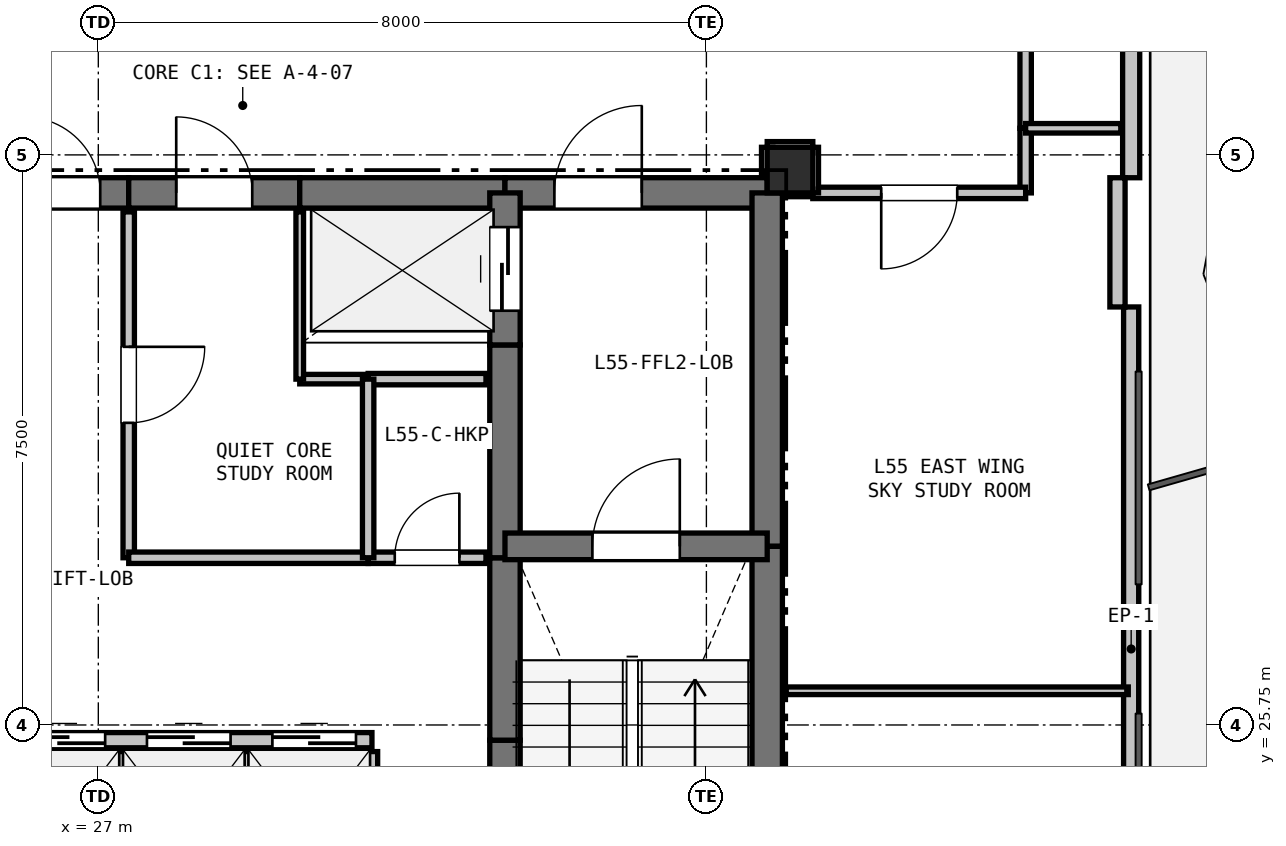
"""IFC4 building model, lengths in metres.
Left out: names, types, materials, properties, quantities, classifications, styles, units other than length and angle.
Written with IfcOpenShell. Run it as: python <this file> out.ifc"""

import sys

from ifc_helpers import new_model, si_unit, direction, frame, frame_2d, origin, origin_2d, place, context, subcontext, project, spatial, rectangle, extrude, element, fill, save


model = new_model("IFC4")
c1 = context("Model", 3, precision=1e-05, world=origin(), true_north=direction((0.0, 1.0)))
c2 = subcontext(c1, "Body", "Model", "MODEL_VIEW")
j1 = project(units=[si_unit("LENGTHUNIT", "METRE"), si_unit("PLANEANGLEUNIT", "RADIAN")], contexts=[c1])
p1 = place(None, origin())
s1 = spatial("IfcSite", under=j1, at=p1, CompositionType="ELEMENT")
p2 = place(p1, origin())
s2 = spatial("IfcBuilding", under=s1, at=p2, CompositionType="ELEMENT")
p3 = place(p2, frame((0.0, 0.0, 198.6)))
s3 = spatial("IfcBuildingStorey", under=s2, at=p3, CompositionType="ELEMENT", Elevation=198.6)
p4 = place(p3, frame((36.1, 33.05, 0.0), z_axis=(0.0, 0.0, 1.0), x_axis=(1.0, 0.0, 0.0)))
e1 = element("IfcColumn", 1, at=p4, inside=s3, PredefinedType="COLUMN", context=c2, shape_type="SweptSolid", body=[
    extrude(rectangle(XDim=0.6, YDim=0.6, at=origin_2d()), origin(), (0.0, 0.0, 1.0), 3.3),
])
p5 = place(p3, frame((19.309, 34.536, 0.0), z_axis=(0.0, 0.0, 1.0), x_axis=(0.866020680503, 0.500008180874, 0.0)))
e2 = element("IfcWall", 2, at=p5, inside=s3, PredefinedType="PARAPET", context=c2, shape_type="SweptSolid", body=[
    extrude(rectangle(XDim=8.999, YDim=0.2, at=frame_2d((4.5, 0.0))), origin(), (0.0, 0.0, 1.0), 0.2),
])
p6 = place(p3, frame((40.588, 42.648, 0.0), z_axis=(0.0, 0.0, 1.0), x_axis=(0.0, -1.0, 0.0)))
e3 = element("IfcWall", 3, at=p6, inside=s3, PredefinedType="SOLIDWALL", context=c2, shape_type="SweptSolid", body=[
    extrude(rectangle(XDim=9.699, YDim=0.225, at=frame_2d((4.85, 0.0))), origin(), (0.0, 0.0, 1.0), 2.69),
])
p7 = place(p6, frame((1.73, 0.0, 0.0)))
e4 = element("IfcOpeningElement", 4, at=p7, cuts=e3, PredefinedType="OPENING", context=c2, shape_type="SweptSolid", body=[
    extrude(rectangle(XDim=1.1, YDim=2.1, at=frame_2d((0.55, 1.05))), frame((0.0, 0.123, 0.0), z_axis=(0.0, -1.0, 0.0), x_axis=(1.0, 0.0, 0.0)), (0.0, 0.0, 1.0), 0.245),
])
p8 = place(p3, frame((40.588, 31.25, 0.0), z_axis=(0.0, 0.0, 1.0), x_axis=(0.0, -1.0, 0.0)))
e5 = element("IfcWall", 5, at=p8, inside=s3, PredefinedType="PARAPET", context=c2, shape_type="SweptSolid", body=[
    extrude(rectangle(XDim=8.999, YDim=0.2, at=frame_2d((4.5, 0.0))), origin(), (0.0, 0.0, 1.0), 0.2),
])
p9 = place(p3, frame((40.408, 32.949, 0.0), z_axis=(0.0, 0.0, 1.0), x_axis=(0.0, -1.0, 0.0)))
e6 = element("IfcWall", 6, at=p9, inside=s3, PredefinedType="PARAPET", context=c2, shape_type="SweptSolid", body=[
    extrude(rectangle(XDim=1.7, YDim=0.2, at=frame_2d((0.85, 0.0))), origin(), (0.0, 0.0, 1.0), 2.69),
])
p10 = place(p3, frame((25.65, 32.75, 0.0), z_axis=(0.0, 0.0, 1.0), x_axis=(1.0, 0.0, 0.0)))
e7 = element("IfcWall", 7, at=p10, inside=s3, PredefinedType="SHEAR", context=c2, shape_type="SweptSolid", body=[
    extrude(rectangle(XDim=1.75, YDim=0.4, at=frame_2d((0.875, 0.0))), origin(), (0.0, 0.0, 1.0), 3.07),
])
p11 = place(p10, frame((0.375, 0.0, 0.0)))
e8 = element("IfcOpeningElement", 8, at=p11, cuts=e7, PredefinedType="OPENING", context=c2, shape_type="SweptSolid", body=[
    extrude(rectangle(XDim=1.0, YDim=2.15, at=frame_2d((0.5, 1.075))), frame((0.0, 0.21, 0.0), z_axis=(0.0, -1.0, 0.0), x_axis=(1.0, 0.0, 0.0)), (0.0, 0.0, 1.0), 0.42),
])
p12 = place(p3, frame((27.4, 32.75, 0.0), z_axis=(0.0, 0.0, 1.0), x_axis=(1.0, 0.0, 0.0)))
e9 = element("IfcWall", 9, at=p12, inside=s3, PredefinedType="SHEAR", context=c2, shape_type="SweptSolid", body=[
    extrude(rectangle(XDim=2.25, YDim=0.4, at=frame_2d((1.125, 0.0))), origin(), (0.0, 0.0, 1.0), 3.07),
])
p13 = place(p12, frame((0.625, 0.0, 0.0)))
e10 = element("IfcOpeningElement", 10, at=p13, cuts=e9, PredefinedType="OPENING", context=c2, shape_type="SweptSolid", body=[
    extrude(rectangle(XDim=1.0, YDim=2.15, at=frame_2d((0.5, 1.075))), frame((0.0, 0.21, 0.0), z_axis=(0.0, -1.0, 0.0), x_axis=(1.0, 0.0, 0.0)), (0.0, 0.0, 1.0), 0.42),
])
p14 = place(p3, frame((29.65, 32.75, 0.0), z_axis=(0.0, 0.0, 1.0), x_axis=(1.0, 0.0, 0.0)))
e11 = element("IfcWall", 11, at=p14, inside=s3, PredefinedType="SHEAR", context=c2, shape_type="SweptSolid", body=[
    extrude(rectangle(XDim=2.7, YDim=0.4, at=frame_2d((1.35, 0.0))), origin(), (0.0, 0.0, 1.0), 3.07),
])
p15 = place(p3, frame((32.35, 32.75, 0.0), z_axis=(0.0, 0.0, 1.0), x_axis=(1.0, 0.0, 0.0)))
e12 = element("IfcWall", 12, at=p15, inside=s3, PredefinedType="SHEAR", context=c2, shape_type="SweptSolid", body=[
    extrude(rectangle(XDim=3.45, YDim=0.4, at=frame_2d((1.725, 0.0))), origin(), (0.0, 0.0, 1.0), 3.07),
])
p16 = place(p15, frame((0.65, 0.0, 0.0)))
e13 = element("IfcOpeningElement", 13, at=p16, cuts=e12, PredefinedType="OPENING", context=c2, shape_type="SweptSolid", body=[
    extrude(rectangle(XDim=1.15, YDim=2.15, at=frame_2d((0.575, 1.075))), frame((0.0, 0.21, 0.0), z_axis=(0.0, -1.0, 0.0), x_axis=(1.0, 0.0, 0.0)), (0.0, 0.0, 1.0), 0.42),
])
p17 = place(p3, frame((35.8, 32.75, 0.0), z_axis=(0.0, 0.0, 1.0), x_axis=(0.0, -1.0, 0.0)))
e14 = element("IfcWall", 14, at=p17, inside=s3, PredefinedType="SHEAR", context=c2, shape_type="SweptSolid", body=[
    extrude(rectangle(XDim=4.65, YDim=0.4, at=frame_2d((2.325, 0.0))), origin(), (0.0, 0.0, 1.0), 3.07),
])
p18 = place(p3, frame((35.8, 28.1, 0.0), z_axis=(0.0, 0.0, 1.0), x_axis=(0.0, -1.0, 0.0)))
e15 = element("IfcWall", 15, at=p18, inside=s3, PredefinedType="SHEAR", context=c2, shape_type="SweptSolid", body=[
    extrude(rectangle(XDim=7.35, YDim=0.4, at=frame_2d((3.675, 0.0))), origin(), (0.0, 0.0, 1.0), 3.07),
])
p19 = place(p3, frame((32.35, 20.75, 0.0), z_axis=(0.0, 0.0, 1.0), x_axis=(0.0, 1.0, 0.0)))
e16 = element("IfcWall", 16, at=p19, inside=s3, PredefinedType="SHEAR", context=c2, shape_type="SweptSolid", body=[
    extrude(rectangle(XDim=4.8, YDim=0.4, at=frame_2d((2.4, 0.0))), origin(), (0.0, 0.0, 1.0), 3.07),
])
p20 = place(p3, frame((32.35, 25.55, 0.0), z_axis=(0.0, 0.0, 1.0), x_axis=(0.0, 1.0, 0.0)))
e17 = element("IfcWall", 17, at=p20, inside=s3, PredefinedType="SHEAR", context=c2, shape_type="SweptSolid", body=[
    extrude(rectangle(XDim=2.4, YDim=0.4, at=frame_2d((1.2, 0.0))), origin(), (0.0, 0.0, 1.0), 3.07),
])
p21 = place(p3, frame((32.35, 27.95, 0.0), z_axis=(0.0, 0.0, 1.0), x_axis=(0.0, 1.0, 0.0)))
e18 = element("IfcWall", 18, at=p21, inside=s3, PredefinedType="SHEAR", context=c2, shape_type="SweptSolid", body=[
    extrude(rectangle(XDim=2.8, YDim=0.4, at=frame_2d((1.4, 0.0))), origin(), (0.0, 0.0, 1.0), 3.07),
])
p22 = place(p3, frame((32.35, 30.75, 0.0), z_axis=(0.0, 0.0, 1.0), x_axis=(0.0, 1.0, 0.0)))
e19 = element("IfcWall", 19, at=p22, inside=s3, PredefinedType="SHEAR", context=c2, shape_type="SweptSolid", body=[
    extrude(rectangle(XDim=2.0, YDim=0.4, at=frame_2d((1.0, 0.0))), origin(), (0.0, 0.0, 1.0), 3.07),
])
p23 = place(p22, frame((0.45, 0.0, 0.0)))
e20 = element("IfcOpeningElement", 20, at=p23, cuts=e19, PredefinedType="OPENING", context=c2, shape_type="SweptSolid", body=[
    extrude(rectangle(XDim=1.1, YDim=2.15, at=frame_2d((0.55, 1.075))), frame((0.0, 0.21, 0.0), z_axis=(0.0, -1.0, 0.0), x_axis=(1.0, 0.0, 0.0)), (0.0, 0.0, 1.0), 0.42),
])
p24 = place(p3, frame((32.35, 28.1, 0.0), z_axis=(0.0, 0.0, 1.0), x_axis=(1.0, 0.0, 0.0)))
e21 = element("IfcWall", 21, at=p24, inside=s3, PredefinedType="SHEAR", context=c2, shape_type="SweptSolid", body=[
    extrude(rectangle(XDim=3.45, YDim=0.35, at=frame_2d((1.725, 0.0))), origin(), (0.0, 0.0, 1.0), 3.07),
])
p25 = place(p24, frame((1.15, 0.0, 0.0)))
e22 = element("IfcOpeningElement", 22, at=p25, cuts=e21, PredefinedType="OPENING", context=c2, shape_type="SweptSolid", body=[
    extrude(rectangle(XDim=1.15, YDim=2.15, at=frame_2d((0.575, 1.075))), frame((0.0, 0.185, 0.0), z_axis=(0.0, -1.0, 0.0), x_axis=(1.0, 0.0, 0.0)), (0.0, 0.0, 1.0), 0.37),
])
p26 = place(p3, frame((25.65, 25.55, 0.0), z_axis=(0.0, 0.0, 1.0), x_axis=(1.0, 0.0, 0.0)))
e23 = element("IfcWall", 23, at=p26, inside=s3, PredefinedType="PARTITIONING", context=c2, shape_type="SweptSolid", body=[
    extrude(rectangle(XDim=4.95, YDim=0.2, at=frame_2d((2.475, 0.0))), origin(), (0.0, 0.0, 1.0), 3.07),
])
p27 = place(p26, frame((0.34, 0.0, 0.0)))
e24 = element("IfcOpeningElement", 24, at=p27, cuts=e23, PredefinedType="OPENING", context=c2, shape_type="SweptSolid", body=[
    extrude(rectangle(XDim=1.1, YDim=2.15, at=frame_2d((0.55, 1.075))), frame((0.0, 0.11, 0.0), z_axis=(0.0, -1.0, 0.0), x_axis=(1.0, 0.0, 0.0)), (0.0, 0.0, 1.0), 0.22),
])
p28 = place(p26, frame((1.99, 0.0, 0.0)))
e25 = element("IfcOpeningElement", 25, at=p28, cuts=e23, PredefinedType="OPENING", context=c2, shape_type="SweptSolid", body=[
    extrude(rectangle(XDim=1.1, YDim=2.15, at=frame_2d((0.55, 1.075))), frame((0.0, 0.11, 0.0), z_axis=(0.0, -1.0, 0.0), x_axis=(1.0, 0.0, 0.0)), (0.0, 0.0, 1.0), 0.22),
])
p29 = place(p26, frame((3.64, 0.0, 0.0)))
e26 = element("IfcOpeningElement", 26, at=p29, cuts=e23, PredefinedType="OPENING", context=c2, shape_type="SweptSolid", body=[
    extrude(rectangle(XDim=1.1, YDim=2.15, at=frame_2d((0.55, 1.075))), frame((0.0, 0.11, 0.0), z_axis=(0.0, -1.0, 0.0), x_axis=(1.0, 0.0, 0.0)), (0.0, 0.0, 1.0), 0.22),
])
p30 = place(p3, frame((32.1, 30.3, 0.0), z_axis=(0.0, 0.0, 1.0), x_axis=(-1.0, 0.0, 0.0)))
e27 = element("IfcWall", 27, at=p30, inside=s3, PredefinedType="PARTITIONING", context=c2, shape_type="SweptSolid", body=[
    extrude(rectangle(XDim=1.55, YDim=0.15, at=frame_2d((0.775, 0.0))), origin(), (0.0, 0.0, 1.0), 3.07),
])
p31 = place(p3, frame((30.55, 30.3, 0.0), z_axis=(0.0, 0.0, 1.0), x_axis=(-1.0, 0.0, 0.0)))
e28 = element("IfcWall", 28, at=p31, inside=s3, PredefinedType="PARTITIONING", context=c2, shape_type="SweptSolid", body=[
    extrude(rectangle(XDim=0.9, YDim=0.125, at=frame_2d((0.45, 0.0))), origin(), (0.0, 0.0, 1.0), 3.07),
])
p32 = place(p3, frame((29.65, 30.3, 0.0), z_axis=(0.0, 0.0, 1.0), x_axis=(0.0, 1.0, 0.0)))
e29 = element("IfcWall", 29, at=p32, inside=s3, PredefinedType="PARTITIONING", context=c2, shape_type="SweptSolid", body=[
    extrude(rectangle(XDim=2.2, YDim=0.1, at=frame_2d((1.1, 0.0))), origin(), (0.0, 0.0, 1.0), 3.07),
])
p33 = place(p3, frame((27.3, 25.4, 0.0), z_axis=(0.0, 0.0, 1.0), x_axis=(0.0, -1.0, 0.0)))
e30 = element("IfcWall", 30, at=p33, inside=s3, PredefinedType="PARTITIONING", context=c2, shape_type="SweptSolid", body=[
    extrude(rectangle(XDim=2.2, YDim=0.125, at=frame_2d((1.1, 0.0))), origin(), (0.0, 0.0, 1.0), 3.07),
])
p34 = place(p3, frame((28.95, 25.4, 0.0), z_axis=(0.0, 0.0, 1.0), x_axis=(0.0, -1.0, 0.0)))
e31 = element("IfcWall", 31, at=p34, inside=s3, PredefinedType="PARTITIONING", context=c2, shape_type="SweptSolid", body=[
    extrude(rectangle(XDim=2.2, YDim=0.1, at=frame_2d((1.1, 0.0))), origin(), (0.0, 0.0, 1.0), 3.07),
])
p35 = place(p3, frame((30.6, 25.4, 0.0), z_axis=(0.0, 0.0, 1.0), x_axis=(0.0, -1.0, 0.0)))
e32 = element("IfcWall", 32, at=p35, inside=s3, PredefinedType="PARTITIONING", context=c2, shape_type="SweptSolid", body=[
    extrude(rectangle(XDim=2.2, YDim=0.15, at=frame_2d((1.1, 0.0))), origin(), (0.0, 0.0, 1.0), 3.07),
])
p36 = place(p3, frame((27.4, 32.5, 0.0), z_axis=(0.0, 0.0, 1.0), x_axis=(0.0, -1.0, 0.0)))
e33 = element("IfcWall", 33, at=p36, inside=s3, PredefinedType="PARTITIONING", context=c2, shape_type="SweptSolid", body=[
    extrude(rectangle(XDim=4.55, YDim=0.15, at=frame_2d((2.275, 0.0))), origin(), (0.0, 0.0, 1.0), 3.07),
])
p37 = place(p36, frame((1.775, 0.0, 0.0)))
e34 = element("IfcOpeningElement", 34, at=p37, cuts=e33, PredefinedType="OPENING", context=c2, shape_type="SweptSolid", body=[
    extrude(rectangle(XDim=1.0, YDim=2.15, at=frame_2d((0.5, 1.075))), frame((0.0, 0.085, 0.0), z_axis=(0.0, -1.0, 0.0), x_axis=(1.0, 0.0, 0.0)), (0.0, 0.0, 1.0), 0.17),
])
p38 = place(p3, frame((27.4, 27.95, 0.0), z_axis=(0.0, 0.0, 1.0), x_axis=(1.0, 0.0, 0.0)))
e35 = element("IfcWall", 35, at=p38, inside=s3, PredefinedType="PARTITIONING", context=c2, shape_type="SweptSolid", body=[
    extrude(rectangle(XDim=3.15, YDim=0.15, at=frame_2d((1.575, 0.0))), origin(), (0.0, 0.0, 1.0), 3.07),
])
p39 = place(p3, frame((30.55, 27.95, 0.0), z_axis=(0.0, 0.0, 1.0), x_axis=(1.0, 0.0, 0.0)))
e36 = element("IfcWall", 36, at=p39, inside=s3, PredefinedType="PARTITIONING", context=c2, shape_type="SweptSolid", body=[
    extrude(rectangle(XDim=1.55, YDim=0.15, at=frame_2d((0.775, 0.0))), origin(), (0.0, 0.0, 1.0), 3.07),
])
p40 = place(p39, frame((0.35, 0.0, 0.0)))
e37 = element("IfcOpeningElement", 37, at=p40, cuts=e36, PredefinedType="OPENING", context=c2, shape_type="SweptSolid", body=[
    extrude(rectangle(XDim=0.85, YDim=2.1, at=frame_2d((0.425, 1.05))), frame((0.0, 0.085, 0.0), z_axis=(0.0, -1.0, 0.0), x_axis=(1.0, 0.0, 0.0)), (0.0, 0.0, 1.0), 0.17),
])
p41 = place(p3, frame((39.2, 35.2, 0.0), z_axis=(0.0, 0.0, 1.0), x_axis=(0.0, -1.0, 0.0)))
e38 = element("IfcWall", 38, at=p41, inside=s3, PredefinedType="PARTITIONING", context=c2, shape_type="SweptSolid", body=[
    extrude(rectangle(XDim=1.6, YDim=0.15, at=frame_2d((0.8, 0.0))), origin(), (0.0, 0.0, 1.0), 3.07),
])
p42 = place(p3, frame((39.2, 33.6, 0.0), z_axis=(0.0, 0.0, 1.0), x_axis=(0.0, -1.0, 0.0)))
e39 = element("IfcWall", 39, at=p42, inside=s3, PredefinedType="PARTITIONING", context=c2, shape_type="SweptSolid", body=[
    extrude(rectangle(XDim=0.85, YDim=0.15, at=frame_2d((0.425, 0.0))), origin(), (0.0, 0.0, 1.0), 3.07),
])
p43 = place(p3, frame((39.2, 32.75, 0.0), z_axis=(0.0, 0.0, 1.0), x_axis=(-1.0, 0.0, 0.0)))
e40 = element("IfcWall", 40, at=p43, inside=s3, PredefinedType="PARTITIONING", context=c2, shape_type="SweptSolid", body=[
    extrude(rectangle(XDim=2.8, YDim=0.15, at=frame_2d((1.4, 0.0))), origin(), (0.0, 0.0, 1.0), 3.07),
])
p44 = place(p43, frame((0.9, 0.0, 0.0)))
e41 = element("IfcOpeningElement", 41, at=p44, cuts=e40, PredefinedType="OPENING", context=c2, shape_type="SweptSolid", body=[
    extrude(rectangle(XDim=1.0, YDim=2.15, at=frame_2d((0.5, 1.075))), frame((0.0, 0.085, 0.0), z_axis=(0.0, -1.0, 0.0), x_axis=(1.0, 0.0, 0.0)), (0.0, 0.0, 1.0), 0.17),
])
p45 = place(p3, frame((36.4, 32.75, 0.0), z_axis=(0.0, 0.0, 1.0), x_axis=(0.0, 1.0, 0.0)))
e42 = element("IfcWall", 42, at=p45, inside=s3, PredefinedType="PARTITIONING", context=c2, shape_type="SweptSolid", body=[
    extrude(rectangle(XDim=0.6, YDim=0.15, at=frame_2d((0.3, 0.0))), origin(), (0.0, 0.0, 1.0), 2.518),
])
p46 = place(p3, frame((36.4, 33.35, 0.0), z_axis=(0.0, 0.0, 1.0), x_axis=(-1.0, 0.0, 0.0)))
e43 = element("IfcWall", 43, at=p46, inside=s3, PredefinedType="PARTITIONING", context=c2, shape_type="SweptSolid", body=[
    extrude(rectangle(XDim=0.6, YDim=0.15, at=frame_2d((0.3, 0.0))), origin(), (0.0, 0.0, 1.0), 2.518),
])
p47 = place(p3, frame((35.8, 33.35, 0.0), z_axis=(0.0, 0.0, 1.0), x_axis=(0.0, -1.0, 0.0)))
e44 = element("IfcWall", 44, at=p47, inside=s3, PredefinedType="PARTITIONING", context=c2, shape_type="SweptSolid", body=[
    extrude(rectangle(XDim=0.35, YDim=0.15, at=frame_2d((0.175, 0.0))), origin(), (0.0, 0.0, 1.0), 2.595),
])
p48 = place(p3, frame((30.55, 30.3, 0.0), z_axis=(0.0, 0.0, 1.0), x_axis=(0.0, -1.0, 0.0)))
e45 = element("IfcWall", 45, at=p48, inside=s3, PredefinedType="PARTITIONING", context=c2, shape_type="SweptSolid", body=[
    extrude(rectangle(XDim=2.35, YDim=0.15, at=frame_2d((1.175, 0.0))), origin(), (0.0, 0.0, 1.0), 3.07),
])
p49 = place(p3, frame((36.05, 32.75, 0.0), z_axis=(0.0, 0.0, 1.0), x_axis=(1.0, 0.0, 0.0)))
e46 = element("IfcWall", 46, at=p49, inside=s3, PredefinedType="PARTITIONING", context=c2, shape_type="SweptSolid", body=[
    extrude(rectangle(XDim=0.35, YDim=0.1, at=frame_2d((0.175, 0.0))), origin(), (0.0, 0.0, 1.0), 2.595),
])
p50 = place(p3, frame((39.2, 33.6, 0.0), z_axis=(0.0, 0.0, 1.0), x_axis=(1.0, 0.0, 0.0)))
e47 = element("IfcWall", 47, at=p50, inside=s3, PredefinedType="PARTITIONING", context=c2, shape_type="SweptSolid", body=[
    extrude(rectangle(XDim=1.252, YDim=0.125, at=frame_2d((0.626, 0.0))), origin(), (0.0, 0.0, 1.0), 2.365),
])
p51 = place(p3, frame((40.55, 26.2, 0.0), z_axis=(0.0, 0.0, 1.0), x_axis=(-1.0, 0.0, 0.0)))
e48 = element("IfcWall", 48, at=p51, inside=s3, PredefinedType="PARTITIONING", context=c2, shape_type="SweptSolid", body=[
    extrude(rectangle(XDim=4.5, YDim=0.1, at=frame_2d((2.25, 0.0))), origin(), (0.0, 0.0, 1.0), 2.365),
])
p52 = place(p27, origin())
e49 = element("IfcDoor", 49, at=p52, inside=s3, OperationType="SLIDING_TO_LEFT", PredefinedType="DOOR", context=c2, shape_type="SweptSolid", body=[
    extrude(rectangle(XDim=1.1, YDim=2.15, at=frame_2d((0.55, 1.075))), frame((0.0, 0.025, 0.0), z_axis=(0.0, -1.0, 0.0), x_axis=(1.0, 0.0, 0.0)), (0.0, 0.0, 1.0), 0.05),
])
fill(e24, e49)
p53 = place(p28, origin())
e50 = element("IfcDoor", 50, at=p53, inside=s3, OperationType="SLIDING_TO_LEFT", PredefinedType="DOOR", context=c2, shape_type="SweptSolid", body=[
    extrude(rectangle(XDim=1.1, YDim=2.15, at=frame_2d((0.55, 1.075))), frame((0.0, 0.025, 0.0), z_axis=(0.0, -1.0, 0.0), x_axis=(1.0, 0.0, 0.0)), (0.0, 0.0, 1.0), 0.05),
])
fill(e25, e50)
p54 = place(p29, origin())
e51 = element("IfcDoor", 51, at=p54, inside=s3, OperationType="SLIDING_TO_LEFT", PredefinedType="DOOR", context=c2, shape_type="SweptSolid", body=[
    extrude(rectangle(XDim=1.1, YDim=2.15, at=frame_2d((0.55, 1.075))), frame((0.0, 0.025, 0.0), z_axis=(0.0, -1.0, 0.0), x_axis=(1.0, 0.0, 0.0)), (0.0, 0.0, 1.0), 0.05),
])
fill(e26, e51)
p55 = place(p11, origin())
e52 = element("IfcDoor", 52, at=p55, inside=s3, OperationType="SINGLE_SWING_LEFT", PredefinedType="DOOR", context=c2, shape_type="SweptSolid", body=[
    extrude(rectangle(XDim=1.0, YDim=2.15, at=frame_2d((0.5, 1.075))), frame((0.0, 0.025, 0.0), z_axis=(0.0, -1.0, 0.0), x_axis=(1.0, 0.0, 0.0)), (0.0, 0.0, 1.0), 0.05),
])
fill(e8, e52)
p56 = place(p23, origin())
e53 = element("IfcDoor", 53, at=p56, inside=s3, OperationType="SLIDING_TO_LEFT", PredefinedType="DOOR", context=c2, shape_type="SweptSolid", body=[
    extrude(rectangle(XDim=1.1, YDim=2.15, at=frame_2d((0.55, 1.075))), frame((0.0, 0.025, 0.0), z_axis=(0.0, -1.0, 0.0), x_axis=(1.0, 0.0, 0.0)), (0.0, 0.0, 1.0), 0.05),
])
fill(e20, e53)
p57 = place(p25, origin())
e54 = element("IfcDoor", 54, at=p57, inside=s3, OperationType="SINGLE_SWING_RIGHT", PredefinedType="DOOR", context=c2, shape_type="SweptSolid", body=[
    extrude(rectangle(XDim=1.15, YDim=2.15, at=frame_2d((0.575, 1.075))), frame((0.0, 0.025, 0.0), z_axis=(0.0, -1.0, 0.0), x_axis=(1.0, 0.0, 0.0)), (0.0, 0.0, 1.0), 0.05),
])
fill(e22, e54)
p58 = place(p16, origin())
e55 = element("IfcDoor", 55, at=p58, inside=s3, OperationType="SINGLE_SWING_RIGHT", PredefinedType="DOOR", context=c2, shape_type="SweptSolid", body=[
    extrude(rectangle(XDim=1.15, YDim=2.15, at=frame_2d((0.575, 1.075))), frame((0.0, 0.025, 0.0), z_axis=(0.0, -1.0, 0.0), x_axis=(1.0, 0.0, 0.0)), (0.0, 0.0, 1.0), 0.05),
])
fill(e13, e55)
p59 = place(p37, origin())
e56 = element("IfcDoor", 56, at=p59, inside=s3, OperationType="SINGLE_SWING_LEFT", PredefinedType="DOOR", context=c2, shape_type="SweptSolid", body=[
    extrude(rectangle(XDim=1.0, YDim=2.15, at=frame_2d((0.5, 1.075))), frame((0.0, 0.025, 0.0), z_axis=(0.0, -1.0, 0.0), x_axis=(1.0, 0.0, 0.0)), (0.0, 0.0, 1.0), 0.05),
])
fill(e34, e56)
p60 = place(p40, origin())
e57 = element("IfcDoor", 57, at=p60, inside=s3, OperationType="SINGLE_SWING_RIGHT", PredefinedType="DOOR", context=c2, shape_type="SweptSolid", body=[
    extrude(rectangle(XDim=0.85, YDim=2.1, at=frame_2d((0.425, 1.05))), frame((0.0, 0.025, 0.0), z_axis=(0.0, -1.0, 0.0), x_axis=(1.0, 0.0, 0.0)), (0.0, 0.0, 1.0), 0.05),
])
fill(e37, e57)
p61 = place(p13, origin())
e58 = element("IfcDoor", 58, at=p61, inside=s3, OperationType="SINGLE_SWING_LEFT", PredefinedType="DOOR", context=c2, shape_type="SweptSolid", body=[
    extrude(rectangle(XDim=1.0, YDim=2.15, at=frame_2d((0.5, 1.075))), frame((0.0, 0.025, 0.0), z_axis=(0.0, -1.0, 0.0), x_axis=(1.0, 0.0, 0.0)), (0.0, 0.0, 1.0), 0.05),
])
fill(e10, e58)
p62 = place(p44, origin())
e59 = element("IfcDoor", 59, at=p62, inside=s3, OperationType="SINGLE_SWING_RIGHT", PredefinedType="DOOR", context=c2, shape_type="SweptSolid", body=[
    extrude(rectangle(XDim=1.0, YDim=2.15, at=frame_2d((0.5, 1.075))), frame((0.0, 0.025, 0.0), z_axis=(0.0, -1.0, 0.0), x_axis=(1.0, 0.0, 0.0)), (0.0, 0.0, 1.0), 0.05),
])
fill(e41, e59)
save(model, sys.argv[1])
